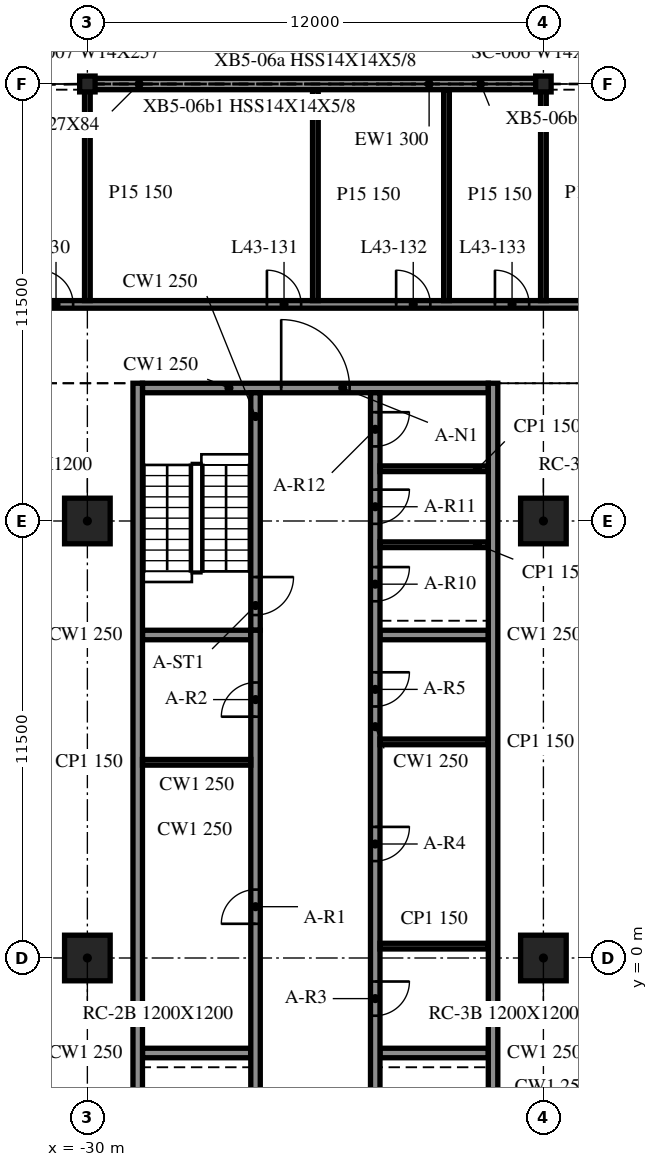
"""IFC4 building model, lengths in metres.
Left out: names, types, materials, properties, quantities, classifications, styles, units other than length and angle.
Written with IfcOpenShell. Run it as: python <this file> out.ifc"""

import sys

from ifc_helpers import new_model, si_unit, direction, frame, frame_2d, origin, origin_2d, place, context, subcontext, project, spatial, rectangle, i_section, extrude, element, fill, save


model = new_model("IFC4")
c1 = context("Model", 3, precision=1e-05, world=origin(), true_north=direction((0.0, 1.0)))
c2 = subcontext(c1, "Body", "Model", "MODEL_VIEW")
j1 = project(units=[si_unit("LENGTHUNIT", "METRE"), si_unit("PLANEANGLEUNIT", "RADIAN")], contexts=[c1])
p1 = place(None, origin())
s1 = spatial("IfcSite", under=j1, at=p1, CompositionType="ELEMENT")
p2 = place(p1, origin())
s2 = spatial("IfcBuilding", under=s1, at=p2, CompositionType="ELEMENT")
p3 = place(p2, frame((0.0, 0.0, 182.0)))
s3 = spatial("IfcBuildingStorey", under=s2, at=p3, CompositionType="ELEMENT", Elevation=182.0)
for number, where, z_axis, x_axis in (
    (1, (-30.0, 0.0, -0.34), (0.0, 0.0, 1.0), (1.0, 0.0, 0.0)),
    (2, (-30.0, 11.5, -0.34), (0.0, 0.0, 1.0), (1.0, 0.0, 0.0)),
    (3, (-18.0, 0.0, -0.34), (0.0, 0.0, 1.0), (1.0, 0.0, 0.0)),
    (4, (-18.0, 11.5, -0.34), (0.0, 0.0, 1.0), (1.0, 0.0, 0.0)),
):
    element("IfcColumn", number, at=place(p3, frame(where, z_axis=z_axis, x_axis=x_axis)), inside=s3, PredefinedType="COLUMN", context=c2, shape_type="SweptSolid", body=[
        extrude(rectangle(XDim=1.2, YDim=1.2, at=origin_2d()), origin(), (0.0, 0.0, 1.0), 3.8),
    ])
for number, where, z_axis, x_axis in (
    (5, (-18.0, 23.0, -0.34), (0.0, 0.0, 1.0), (1.0, 0.0, 0.0)),
    (6, (-30.0, 23.0, -0.34), (0.0, 0.0, 1.0), (1.0, 0.0, 0.0)),
):
    element("IfcColumn", number, at=place(p3, frame(where, z_axis=z_axis, x_axis=x_axis)), inside=s3, PredefinedType="COLUMN", context=c2, shape_type="SweptSolid", body=[
        extrude(i_section(OverallWidth=0.406, OverallDepth=0.417, WebThickness=0.03, FlangeThickness=0.048, at=origin_2d()), origin(), (0.0, 0.0, 1.0), 3.8),
    ])
p4 = place(p3, frame((-18.015, 23.0, 0.0), z_axis=(0.0, 0.0, 1.0), x_axis=(-1.0, 0.0, 0.0)))
e7 = element("IfcWall", 7, at=p4, inside=s3, PredefinedType="NOTDEFINED", context=c2, shape_type="SweptSolid", body=[
    extrude(rectangle(XDim=11.97, YDim=0.3, at=frame_2d((5.985, 0.0))), origin(), (0.0, 0.0, 1.0), 2.782),
])
for number, where, z_axis, x_axis in (
    (8, (-28.675, 15.125, 0.0), (0.0, 0.0, 1.0), (0.0, -1.0, 0.0)),
    (9, (-19.325, -9.125, 0.0), (0.0, 0.0, 1.0), (0.0, 1.0, 0.0)),
):
    element("IfcWall", number, at=place(p3, frame(where, z_axis=z_axis, x_axis=x_axis)), inside=s3, PredefinedType="SOLIDWALL", context=c2, shape_type="SweptSolid", body=[
        extrude(rectangle(XDim=24.25, YDim=0.25, at=frame_2d((12.125, 0.0))), origin(), (0.0, 0.0, 1.0), 3.46),
    ])
p5 = place(p3, frame((-28.55, 15.0, 0.0), z_axis=(0.0, 0.0, 1.0), x_axis=(1.0, 0.0, 0.0)))
e10 = element("IfcWall", 10, at=p5, inside=s3, PredefinedType="SOLIDWALL", context=c2, shape_type="SweptSolid", body=[
    extrude(rectangle(XDim=9.1, YDim=0.25, at=frame_2d((4.55, 0.0))), origin(), (0.0, 0.0, 1.0), 3.46),
])
p6 = place(p5, frame((3.65, 0.0, 0.0)))
e11 = element("IfcOpeningElement", 11, at=p6, cuts=e10, PredefinedType="OPENING", context=c2, shape_type="SweptSolid", body=[
    extrude(rectangle(XDim=1.8, YDim=2.1, at=frame_2d((0.9, 1.05))), frame((0.0, 0.135, 0.0), z_axis=(0.0, -1.0, 0.0), x_axis=(1.0, 0.0, 0.0)), (0.0, 0.0, 1.0), 0.27),
])
p7 = place(p3, frame((-25.575, -8.875, 0.0), z_axis=(0.0, 0.0, 1.0), x_axis=(0.0, 1.0, 0.0)))
e12 = element("IfcWall", 12, at=p7, inside=s3, PredefinedType="SOLIDWALL", context=c2, shape_type="SweptSolid", body=[
    extrude(rectangle(XDim=17.5, YDim=0.25, at=frame_2d((8.75, 0.0))), origin(), (0.0, 0.0, 1.0), 3.46),
])
p8 = place(p7, frame((9.775, 0.0, 0.0)))
e13 = element("IfcOpeningElement", 13, at=p8, cuts=e12, PredefinedType="OPENING", context=c2, shape_type="SweptSolid", body=[
    extrude(rectangle(XDim=0.9, YDim=2.1, at=frame_2d((0.45, 1.05))), frame((0.0, 0.135, 0.0), z_axis=(0.0, -1.0, 0.0), x_axis=(1.0, 0.0, 0.0)), (0.0, 0.0, 1.0), 0.27),
])
p9 = place(p7, frame((15.225, 0.0, 0.0)))
e14 = element("IfcOpeningElement", 14, at=p9, cuts=e12, PredefinedType="OPENING", context=c2, shape_type="SweptSolid", body=[
    extrude(rectangle(XDim=0.9, YDim=2.1, at=frame_2d((0.45, 1.05))), frame((0.0, 0.135, 0.0), z_axis=(0.0, -1.0, 0.0), x_axis=(1.0, 0.0, 0.0)), (0.0, 0.0, 1.0), 0.27),
])
p10 = place(p7, frame((0.712, 0.0, 0.0)))
e15 = element("IfcOpeningElement", 15, at=p10, cuts=e12, PredefinedType="OPENING", context=c2, shape_type="SweptSolid", body=[
    extrude(rectangle(XDim=0.9, YDim=2.1, at=frame_2d((0.45, 1.05))), frame((0.0, 0.135, 0.0), z_axis=(0.0, -1.0, 0.0), x_axis=(1.0, 0.0, 0.0)), (0.0, 0.0, 1.0), 0.27),
])
p11 = place(p7, frame((3.788, 0.0, 0.0)))
e16 = element("IfcOpeningElement", 16, at=p11, cuts=e12, PredefinedType="OPENING", context=c2, shape_type="SweptSolid", body=[
    extrude(rectangle(XDim=0.9, YDim=2.1, at=frame_2d((0.45, 1.05))), frame((0.0, 0.135, 0.0), z_axis=(0.0, -1.0, 0.0), x_axis=(1.0, 0.0, 0.0)), (0.0, 0.0, 1.0), 0.27),
])
p12 = place(p3, frame((-25.575, 14.875, 0.0), z_axis=(0.0, 0.0, 1.0), x_axis=(0.0, -1.0, 0.0)))
e17 = element("IfcWall", 17, at=p12, inside=s3, PredefinedType="SOLIDWALL", context=c2, shape_type="SweptSolid", body=[
    extrude(rectangle(XDim=6.25, YDim=0.25, at=frame_2d((3.125, 0.0))), origin(), (0.0, 0.0, 1.0), 3.46),
])
p13 = place(p12, frame((4.85, 0.0, 0.0)))
e18 = element("IfcOpeningElement", 18, at=p13, cuts=e17, PredefinedType="OPENING", context=c2, shape_type="SweptSolid", body=[
    extrude(rectangle(XDim=1.0, YDim=2.1, at=frame_2d((0.5, 1.05))), frame((0.0, 0.135, 0.0), z_axis=(0.0, -1.0, 0.0), x_axis=(1.0, 0.0, 0.0)), (0.0, 0.0, 1.0), 0.27),
])
p14 = place(p3, frame((-22.425, 14.875, 0.0), z_axis=(0.0, 0.0, 1.0), x_axis=(0.0, -1.0, 0.0)))
e19 = element("IfcWall", 19, at=p14, inside=s3, PredefinedType="SOLIDWALL", context=c2, shape_type="SweptSolid", body=[
    extrude(rectangle(XDim=23.75, YDim=0.25, at=frame_2d((11.875, 0.0))), origin(), (0.0, 0.0, 1.0), 3.46),
])
p15 = place(p14, frame((15.494, 0.0, 0.0)))
e20 = element("IfcOpeningElement", 20, at=p15, cuts=e19, PredefinedType="OPENING", context=c2, shape_type="SweptSolid", body=[
    extrude(rectangle(XDim=0.9, YDim=2.1, at=frame_2d((0.45, 1.05))), frame((0.0, 0.135, 0.0), z_axis=(0.0, -1.0, 0.0), x_axis=(1.0, 0.0, 0.0)), (0.0, 0.0, 1.0), 0.27),
])
p16 = place(p14, frame((11.425, 0.0, 0.0)))
e21 = element("IfcOpeningElement", 21, at=p16, cuts=e19, PredefinedType="OPENING", context=c2, shape_type="SweptSolid", body=[
    extrude(rectangle(XDim=0.9, YDim=2.1, at=frame_2d((0.45, 1.05))), frame((0.0, 0.135, 0.0), z_axis=(0.0, -1.0, 0.0), x_axis=(1.0, 0.0, 0.0)), (0.0, 0.0, 1.0), 0.27),
])
p17 = place(p14, frame((7.356, 0.0, 0.0)))
e22 = element("IfcOpeningElement", 22, at=p17, cuts=e19, PredefinedType="OPENING", context=c2, shape_type="SweptSolid", body=[
    extrude(rectangle(XDim=0.9, YDim=2.1, at=frame_2d((0.45, 1.05))), frame((0.0, 0.135, 0.0), z_axis=(0.0, -1.0, 0.0), x_axis=(1.0, 0.0, 0.0)), (0.0, 0.0, 1.0), 0.27),
])
p18 = place(p14, frame((21.837, 0.0, 0.0)))
e23 = element("IfcOpeningElement", 23, at=p18, cuts=e19, PredefinedType="OPENING", context=c2, shape_type="SweptSolid", body=[
    extrude(rectangle(XDim=0.9, YDim=2.1, at=frame_2d((0.45, 1.05))), frame((0.0, 0.135, 0.0), z_axis=(0.0, -1.0, 0.0), x_axis=(1.0, 0.0, 0.0)), (0.0, 0.0, 1.0), 0.27),
])
p19 = place(p14, frame((18.762, 0.0, 0.0)))
e24 = element("IfcOpeningElement", 24, at=p19, cuts=e19, PredefinedType="OPENING", context=c2, shape_type="SweptSolid", body=[
    extrude(rectangle(XDim=0.9, YDim=2.1, at=frame_2d((0.45, 1.05))), frame((0.0, 0.135, 0.0), z_axis=(0.0, -1.0, 0.0), x_axis=(1.0, 0.0, 0.0)), (0.0, 0.0, 1.0), 0.27),
])
p20 = place(p14, frame((4.587, 0.0, 0.0)))
e25 = element("IfcOpeningElement", 25, at=p20, cuts=e19, PredefinedType="OPENING", context=c2, shape_type="SweptSolid", body=[
    extrude(rectangle(XDim=0.9, YDim=2.1, at=frame_2d((0.45, 1.05))), frame((0.0, 0.135, 0.0), z_axis=(0.0, -1.0, 0.0), x_axis=(1.0, 0.0, 0.0)), (0.0, 0.0, 1.0), 0.27),
])
p21 = place(p14, frame((2.55, 0.0, 0.0)))
e26 = element("IfcOpeningElement", 26, at=p21, cuts=e19, PredefinedType="OPENING", context=c2, shape_type="SweptSolid", body=[
    extrude(rectangle(XDim=0.9, YDim=2.1, at=frame_2d((0.45, 1.05))), frame((0.0, 0.135, 0.0), z_axis=(0.0, -1.0, 0.0), x_axis=(1.0, 0.0, 0.0)), (0.0, 0.0, 1.0), 0.27),
])
p22 = place(p14, frame((0.512, 0.0, 0.0)))
e27 = element("IfcOpeningElement", 27, at=p22, cuts=e19, PredefinedType="OPENING", context=c2, shape_type="SweptSolid", body=[
    extrude(rectangle(XDim=0.9, YDim=2.1, at=frame_2d((0.45, 1.05))), frame((0.0, 0.135, 0.0), z_axis=(0.0, -1.0, 0.0), x_axis=(1.0, 0.0, 0.0)), (0.0, 0.0, 1.0), 0.27),
])
for number, where, z_axis, x_axis in (
    (28, (-28.55, -2.5, 0.0), (0.0, 0.0, 1.0), (1.0, 0.0, 0.0)),
    (29, (-28.55, 8.5, 0.0), (0.0, 0.0, 1.0), (1.0, 0.0, 0.0)),
    (30, (-22.3, -2.5, 0.0), (0.0, 0.0, 1.0), (1.0, 0.0, 0.0)),
    (31, (-22.3, 8.5, 0.0), (0.0, 0.0, 1.0), (1.0, 0.0, 0.0)),
):
    element("IfcWall", number, at=place(p3, frame(where, z_axis=z_axis, x_axis=x_axis)), inside=s3, PredefinedType="SOLIDWALL", context=c2, shape_type="SweptSolid", body=[
        extrude(rectangle(XDim=2.85, YDim=0.25, at=frame_2d((1.425, 0.0))), origin(), (0.0, 0.0, 1.0), 3.46),
    ])
for number, where, z_axis, x_axis in (
    (32, (-28.55, 5.15, 0.0), (0.0, 0.0, 1.0), (1.0, 0.0, 0.0)),
    (33, (-22.3, 0.312, 0.0), (0.0, 0.0, 1.0), (1.0, 0.0, 0.0)),
    (34, (-22.3, 5.688, 0.0), (0.0, 0.0, 1.0), (1.0, 0.0, 0.0)),
    (35, (-22.3, 10.875, 0.0), (0.0, 0.0, 1.0), (1.0, 0.0, 0.0)),
    (36, (-22.3, 12.875, 0.0), (0.0, 0.0, 1.0), (1.0, 0.0, 0.0)),
):
    element("IfcWall", number, at=place(p3, frame(where, z_axis=z_axis, x_axis=x_axis)), inside=s3, PredefinedType="PARTITIONING", context=c2, shape_type="SweptSolid", body=[
        extrude(rectangle(XDim=2.85, YDim=0.15, at=frame_2d((1.425, 0.0))), origin(), (0.0, 0.0, 1.0), 3.46),
    ])
p23 = place(p3, frame((-47.975, 17.2, 0.0), z_axis=(0.0, 0.0, 1.0), x_axis=(1.0, 0.0, 0.0)))
e37 = element("IfcWall", 37, at=p23, inside=s3, PredefinedType="PARTITIONING", context=c2, shape_type="SweptSolid", body=[
    extrude(rectangle(XDim=95.95, YDim=0.2, at=frame_2d((47.975, 0.0))), origin(), (0.0, 0.0, 1.0), 3.46),
])
p24 = place(p23, frame((7.7, 0.0, 0.0)))
e38 = element("IfcOpeningElement", 38, at=p24, cuts=e37, PredefinedType="OPENING", context=c2, shape_type="SweptSolid", body=[
    extrude(rectangle(XDim=0.9, YDim=2.1, at=frame_2d((0.45, 1.05))), frame((0.0, 0.11, 0.0), z_axis=(0.0, -1.0, 0.0), x_axis=(1.0, 0.0, 0.0)), (0.0, 0.0, 1.0), 0.22),
])
p25 = place(p23, frame((16.7, 0.0, 0.0)))
e39 = element("IfcOpeningElement", 39, at=p25, cuts=e37, PredefinedType="OPENING", context=c2, shape_type="SweptSolid", body=[
    extrude(rectangle(XDim=0.9, YDim=2.1, at=frame_2d((0.45, 1.05))), frame((0.0, 0.11, 0.0), z_axis=(0.0, -1.0, 0.0), x_axis=(1.0, 0.0, 0.0)), (0.0, 0.0, 1.0), 0.22),
])
p26 = place(p23, frame((22.7, 0.0, 0.0)))
e40 = element("IfcOpeningElement", 40, at=p26, cuts=e37, PredefinedType="OPENING", context=c2, shape_type="SweptSolid", body=[
    extrude(rectangle(XDim=0.9, YDim=2.1, at=frame_2d((0.45, 1.05))), frame((0.0, 0.11, 0.0), z_axis=(0.0, -1.0, 0.0), x_axis=(1.0, 0.0, 0.0)), (0.0, 0.0, 1.0), 0.22),
])
p27 = place(p23, frame((26.1, 0.0, 0.0)))
e41 = element("IfcOpeningElement", 41, at=p27, cuts=e37, PredefinedType="OPENING", context=c2, shape_type="SweptSolid", body=[
    extrude(rectangle(XDim=0.9, YDim=2.1, at=frame_2d((0.45, 1.05))), frame((0.0, 0.11, 0.0), z_axis=(0.0, -1.0, 0.0), x_axis=(1.0, 0.0, 0.0)), (0.0, 0.0, 1.0), 0.22),
])
p28 = place(p23, frame((28.7, 0.0, 0.0)))
e42 = element("IfcOpeningElement", 42, at=p28, cuts=e37, PredefinedType="OPENING", context=c2, shape_type="SweptSolid", body=[
    extrude(rectangle(XDim=0.9, YDim=2.1, at=frame_2d((0.45, 1.05))), frame((0.0, 0.11, 0.0), z_axis=(0.0, -1.0, 0.0), x_axis=(1.0, 0.0, 0.0)), (0.0, 0.0, 1.0), 0.22),
])
p29 = place(p23, frame((37.7, 0.0, 0.0)))
e43 = element("IfcOpeningElement", 43, at=p29, cuts=e37, PredefinedType="OPENING", context=c2, shape_type="SweptSolid", body=[
    extrude(rectangle(XDim=0.9, YDim=2.1, at=frame_2d((0.45, 1.05))), frame((0.0, 0.11, 0.0), z_axis=(0.0, -1.0, 0.0), x_axis=(1.0, 0.0, 0.0)), (0.0, 0.0, 1.0), 0.22),
])
p30 = place(p23, frame((46.7, 0.0, 0.0)))
e44 = element("IfcOpeningElement", 44, at=p30, cuts=e37, PredefinedType="OPENING", context=c2, shape_type="SweptSolid", body=[
    extrude(rectangle(XDim=0.9, YDim=2.1, at=frame_2d((0.45, 1.05))), frame((0.0, 0.11, 0.0), z_axis=(0.0, -1.0, 0.0), x_axis=(1.0, 0.0, 0.0)), (0.0, 0.0, 1.0), 0.22),
])
p31 = place(p23, frame((48.1, 0.0, 0.0)))
e45 = element("IfcOpeningElement", 45, at=p31, cuts=e37, PredefinedType="OPENING", context=c2, shape_type="SweptSolid", body=[
    extrude(rectangle(XDim=0.9, YDim=2.1, at=frame_2d((0.45, 1.05))), frame((0.0, 0.11, 0.0), z_axis=(0.0, -1.0, 0.0), x_axis=(1.0, 0.0, 0.0)), (0.0, 0.0, 1.0), 0.22),
])
p32 = place(p23, frame((54.1, 0.0, 0.0)))
e46 = element("IfcOpeningElement", 46, at=p32, cuts=e37, PredefinedType="OPENING", context=c2, shape_type="SweptSolid", body=[
    extrude(rectangle(XDim=0.9, YDim=2.1, at=frame_2d((0.45, 1.05))), frame((0.0, 0.11, 0.0), z_axis=(0.0, -1.0, 0.0), x_axis=(1.0, 0.0, 0.0)), (0.0, 0.0, 1.0), 0.22),
])
p33 = place(p23, frame((57.5, 0.0, 0.0)))
e47 = element("IfcOpeningElement", 47, at=p33, cuts=e37, PredefinedType="OPENING", context=c2, shape_type="SweptSolid", body=[
    extrude(rectangle(XDim=0.9, YDim=2.1, at=frame_2d((0.45, 1.05))), frame((0.0, 0.11, 0.0), z_axis=(0.0, -1.0, 0.0), x_axis=(1.0, 0.0, 0.0)), (0.0, 0.0, 1.0), 0.22),
])
p34 = place(p23, frame((60.1, 0.0, 0.0)))
e48 = element("IfcOpeningElement", 48, at=p34, cuts=e37, PredefinedType="OPENING", context=c2, shape_type="SweptSolid", body=[
    extrude(rectangle(XDim=0.9, YDim=2.1, at=frame_2d((0.45, 1.05))), frame((0.0, 0.11, 0.0), z_axis=(0.0, -1.0, 0.0), x_axis=(1.0, 0.0, 0.0)), (0.0, 0.0, 1.0), 0.22),
])
p35 = place(p23, frame((69.1, 0.0, 0.0)))
e49 = element("IfcOpeningElement", 49, at=p35, cuts=e37, PredefinedType="OPENING", context=c2, shape_type="SweptSolid", body=[
    extrude(rectangle(XDim=0.9, YDim=2.1, at=frame_2d((0.45, 1.05))), frame((0.0, 0.11, 0.0), z_axis=(0.0, -1.0, 0.0), x_axis=(1.0, 0.0, 0.0)), (0.0, 0.0, 1.0), 0.22),
])
p36 = place(p23, frame((78.1, 0.0, 0.0)))
e50 = element("IfcOpeningElement", 50, at=p36, cuts=e37, PredefinedType="OPENING", context=c2, shape_type="SweptSolid", body=[
    extrude(rectangle(XDim=0.9, YDim=2.1, at=frame_2d((0.45, 1.05))), frame((0.0, 0.11, 0.0), z_axis=(0.0, -1.0, 0.0), x_axis=(1.0, 0.0, 0.0)), (0.0, 0.0, 1.0), 0.22),
])
p37 = place(p23, frame((84.1, 0.0, 0.0)))
e51 = element("IfcOpeningElement", 51, at=p37, cuts=e37, PredefinedType="OPENING", context=c2, shape_type="SweptSolid", body=[
    extrude(rectangle(XDim=0.9, YDim=2.1, at=frame_2d((0.45, 1.05))), frame((0.0, 0.11, 0.0), z_axis=(0.0, -1.0, 0.0), x_axis=(1.0, 0.0, 0.0)), (0.0, 0.0, 1.0), 0.22),
])
p38 = place(p23, frame((87.5, 0.0, 0.0)))
e52 = element("IfcOpeningElement", 52, at=p38, cuts=e37, PredefinedType="OPENING", context=c2, shape_type="SweptSolid", body=[
    extrude(rectangle(XDim=0.9, YDim=2.1, at=frame_2d((0.45, 1.05))), frame((0.0, 0.11, 0.0), z_axis=(0.0, -1.0, 0.0), x_axis=(1.0, 0.0, 0.0)), (0.0, 0.0, 1.0), 0.22),
])
p39 = place(p23, frame((90.1, 0.0, 0.0)))
e53 = element("IfcOpeningElement", 53, at=p39, cuts=e37, PredefinedType="OPENING", context=c2, shape_type="SweptSolid", body=[
    extrude(rectangle(XDim=0.9, YDim=2.1, at=frame_2d((0.45, 1.05))), frame((0.0, 0.11, 0.0), z_axis=(0.0, -1.0, 0.0), x_axis=(1.0, 0.0, 0.0)), (0.0, 0.0, 1.0), 0.22),
])
p40 = place(p3, frame((-30.0, 17.3, 0.0), z_axis=(0.0, 0.0, 1.0), x_axis=(0.0, 1.0, 0.0)))
e54 = element("IfcWall", 54, at=p40, inside=s3, PredefinedType="PARTITIONING", context=c2, shape_type="SweptSolid", body=[
    extrude(rectangle(XDim=5.675, YDim=0.15, at=frame_2d((2.837, 0.0))), origin(), (0.0, 0.0, 1.0), 3.46),
])
for number, where, z_axis, x_axis in (
    (55, (-24.0, 17.3, 0.0), (0.0, 0.0, 1.0), (0.0, 1.0, 0.0)),
    (56, (-20.55, 17.3, 0.0), (0.0, 0.0, 1.0), (0.0, 1.0, 0.0)),
):
    element("IfcWall", number, at=place(p3, frame(where, z_axis=z_axis, x_axis=x_axis)), inside=s3, PredefinedType="PARTITIONING", context=c2, shape_type="SweptSolid", body=[
        extrude(rectangle(XDim=5.55, YDim=0.15, at=frame_2d((2.775, 0.0))), origin(), (0.0, 0.0, 1.0), 3.46),
    ])
p41 = place(p3, frame((-18.0, 17.3, 0.0), z_axis=(0.0, 0.0, 1.0), x_axis=(0.0, 1.0, 0.0)))
e57 = element("IfcWall", 57, at=p41, inside=s3, PredefinedType="PARTITIONING", context=c2, shape_type="SweptSolid", body=[
    extrude(rectangle(XDim=5.675, YDim=0.15, at=frame_2d((2.837, 0.0))), origin(), (0.0, 0.0, 1.0), 3.46),
])
p42 = place(p6, origin())
e58 = element("IfcDoor", 58, at=p42, inside=s3, OperationType="DOUBLE_DOOR_SINGLE_SWING", PredefinedType="DOOR", context=c2, shape_type="SweptSolid", body=[
    extrude(rectangle(XDim=1.8, YDim=2.1, at=frame_2d((0.9, 1.05))), frame((0.0, 0.025, 0.0), z_axis=(0.0, -1.0, 0.0), x_axis=(1.0, 0.0, 0.0)), (0.0, 0.0, 1.0), 0.05),
])
fill(e11, e58)
p43 = place(p8, origin())
e59 = element("IfcDoor", 59, at=p43, inside=s3, OperationType="SINGLE_SWING_LEFT", PredefinedType="DOOR", context=c2, shape_type="SweptSolid", body=[
    extrude(rectangle(XDim=0.9, YDim=2.1, at=frame_2d((0.45, 1.05))), frame((0.0, 0.025, 0.0), z_axis=(0.0, -1.0, 0.0), x_axis=(1.0, 0.0, 0.0)), (0.0, 0.0, 1.0), 0.05),
])
fill(e13, e59)
p44 = place(p9, origin())
e60 = element("IfcDoor", 60, at=p44, inside=s3, OperationType="SINGLE_SWING_RIGHT", PredefinedType="DOOR", context=c2, shape_type="SweptSolid", body=[
    extrude(rectangle(XDim=0.9, YDim=2.1, at=frame_2d((0.45, 1.05))), frame((0.0, 0.025, 0.0), z_axis=(0.0, -1.0, 0.0), x_axis=(1.0, 0.0, 0.0)), (0.0, 0.0, 1.0), 0.05),
])
fill(e14, e60)
p45 = place(p15, origin())
e61 = element("IfcDoor", 61, at=p45, inside=s3, OperationType="SINGLE_SWING_LEFT", PredefinedType="DOOR", context=c2, shape_type="SweptSolid", body=[
    extrude(rectangle(XDim=0.9, YDim=2.1, at=frame_2d((0.45, 1.05))), frame((0.0, 0.025, 0.0), z_axis=(0.0, -1.0, 0.0), x_axis=(1.0, 0.0, 0.0)), (0.0, 0.0, 1.0), 0.05),
])
fill(e20, e61)
p46 = place(p16, origin())
e62 = element("IfcDoor", 62, at=p46, inside=s3, OperationType="SINGLE_SWING_RIGHT", PredefinedType="DOOR", context=c2, shape_type="SweptSolid", body=[
    extrude(rectangle(XDim=0.9, YDim=2.1, at=frame_2d((0.45, 1.05))), frame((0.0, 0.025, 0.0), z_axis=(0.0, -1.0, 0.0), x_axis=(1.0, 0.0, 0.0)), (0.0, 0.0, 1.0), 0.05),
])
fill(e21, e62)
p47 = place(p17, origin())
e63 = element("IfcDoor", 63, at=p47, inside=s3, OperationType="SINGLE_SWING_LEFT", PredefinedType="DOOR", context=c2, shape_type="SweptSolid", body=[
    extrude(rectangle(XDim=0.9, YDim=2.1, at=frame_2d((0.45, 1.05))), frame((0.0, 0.025, 0.0), z_axis=(0.0, -1.0, 0.0), x_axis=(1.0, 0.0, 0.0)), (0.0, 0.0, 1.0), 0.05),
])
fill(e22, e63)
p48 = place(p20, origin())
e64 = element("IfcDoor", 64, at=p48, inside=s3, OperationType="SINGLE_SWING_RIGHT", PredefinedType="DOOR", context=c2, shape_type="SweptSolid", body=[
    extrude(rectangle(XDim=0.9, YDim=2.1, at=frame_2d((0.45, 1.05))), frame((0.0, 0.025, 0.0), z_axis=(0.0, -1.0, 0.0), x_axis=(1.0, 0.0, 0.0)), (0.0, 0.0, 1.0), 0.05),
])
fill(e25, e64)
p49 = place(p21, origin())
e65 = element("IfcDoor", 65, at=p49, inside=s3, OperationType="SINGLE_SWING_LEFT", PredefinedType="DOOR", context=c2, shape_type="SweptSolid", body=[
    extrude(rectangle(XDim=0.9, YDim=2.1, at=frame_2d((0.45, 1.05))), frame((0.0, 0.025, 0.0), z_axis=(0.0, -1.0, 0.0), x_axis=(1.0, 0.0, 0.0)), (0.0, 0.0, 1.0), 0.05),
])
fill(e26, e65)
p50 = place(p22, origin())
e66 = element("IfcDoor", 66, at=p50, inside=s3, OperationType="SINGLE_SWING_RIGHT", PredefinedType="DOOR", context=c2, shape_type="SweptSolid", body=[
    extrude(rectangle(XDim=0.9, YDim=2.1, at=frame_2d((0.45, 1.05))), frame((0.0, 0.025, 0.0), z_axis=(0.0, -1.0, 0.0), x_axis=(1.0, 0.0, 0.0)), (0.0, 0.0, 1.0), 0.05),
])
fill(e27, e66)
p51 = place(p13, origin())
e67 = element("IfcDoor", 67, at=p51, inside=s3, OperationType="SINGLE_SWING_LEFT", PredefinedType="DOOR", context=c2, shape_type="SweptSolid", body=[
    extrude(rectangle(XDim=1.0, YDim=2.1, at=frame_2d((0.5, 1.05))), frame((0.0, 0.025, 0.0), z_axis=(0.0, -1.0, 0.0), x_axis=(1.0, 0.0, 0.0)), (0.0, 0.0, 1.0), 0.05),
])
fill(e18, e67)
p52 = place(p25, origin())
e68 = element("IfcDoor", 68, at=p52, inside=s3, OperationType="SINGLE_SWING_LEFT", PredefinedType="DOOR", context=c2, shape_type="SweptSolid", body=[
    extrude(rectangle(XDim=0.9, YDim=2.1, at=frame_2d((0.45, 1.05))), frame((0.0, 0.025, 0.0), z_axis=(0.0, -1.0, 0.0), x_axis=(1.0, 0.0, 0.0)), (0.0, 0.0, 1.0), 0.05),
])
fill(e39, e68)
p53 = place(p26, origin())
e69 = element("IfcDoor", 69, at=p53, inside=s3, OperationType="SINGLE_SWING_LEFT", PredefinedType="DOOR", context=c2, shape_type="SweptSolid", body=[
    extrude(rectangle(XDim=0.9, YDim=2.1, at=frame_2d((0.45, 1.05))), frame((0.0, 0.025, 0.0), z_axis=(0.0, -1.0, 0.0), x_axis=(1.0, 0.0, 0.0)), (0.0, 0.0, 1.0), 0.05),
])
fill(e40, e69)
p54 = place(p27, origin())
e70 = element("IfcDoor", 70, at=p54, inside=s3, OperationType="SINGLE_SWING_LEFT", PredefinedType="DOOR", context=c2, shape_type="SweptSolid", body=[
    extrude(rectangle(XDim=0.9, YDim=2.1, at=frame_2d((0.45, 1.05))), frame((0.0, 0.025, 0.0), z_axis=(0.0, -1.0, 0.0), x_axis=(1.0, 0.0, 0.0)), (0.0, 0.0, 1.0), 0.05),
])
fill(e41, e70)
p55 = place(p28, origin())
e71 = element("IfcDoor", 71, at=p55, inside=s3, OperationType="SINGLE_SWING_LEFT", PredefinedType="DOOR", context=c2, shape_type="SweptSolid", body=[
    extrude(rectangle(XDim=0.9, YDim=2.1, at=frame_2d((0.45, 1.05))), frame((0.0, 0.025, 0.0), z_axis=(0.0, -1.0, 0.0), x_axis=(1.0, 0.0, 0.0)), (0.0, 0.0, 1.0), 0.05),
])
fill(e42, e71)
save(model, sys.argv[1])
